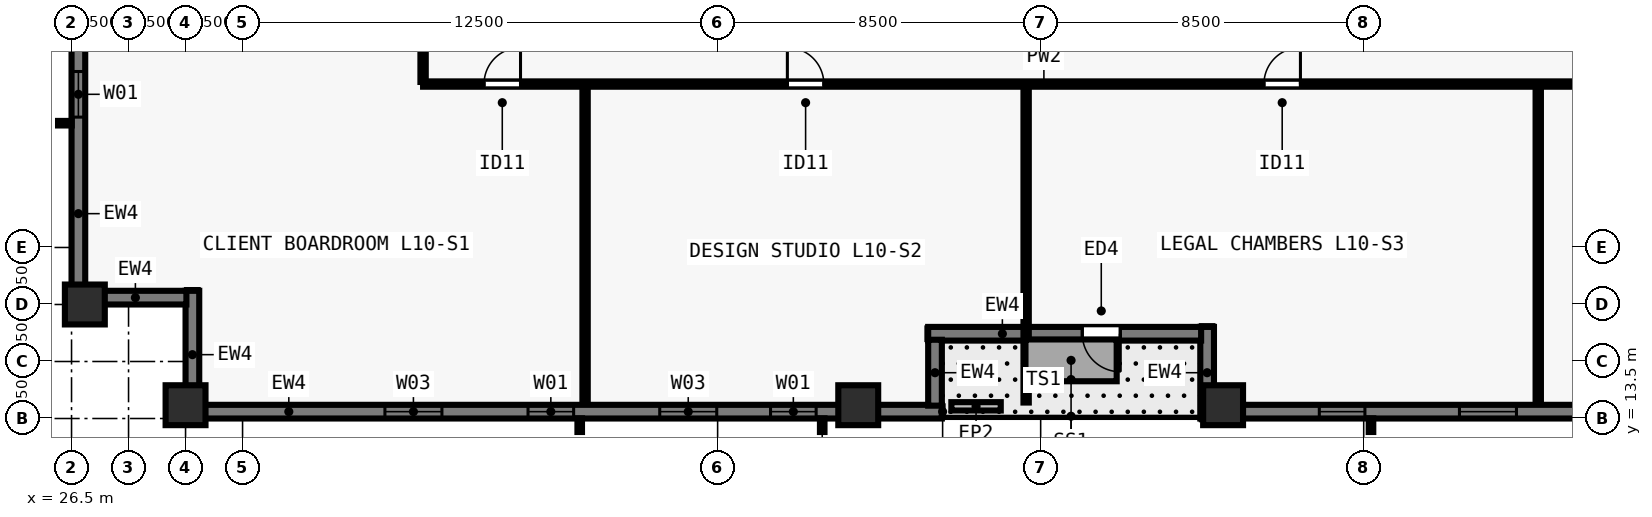
"""IFC4 building model, lengths in metres.
Left out: names, types, materials, properties, quantities, classifications, styles, units other than length and angle.
Written with IfcOpenShell. Run it as: python <this file> out.ifc"""

import sys

from ifc_helpers import new_model, si_unit, direction, frame, frame_2d, origin, origin_2d, place, context, subcontext, project, spatial, rectangle, extrude, element, fill, save


model = new_model("IFC4")
c1 = context("Model", 3, precision=1e-05, world=origin(), true_north=direction((0.0, 1.0)))
c2 = subcontext(c1, "Body", "Model", "MODEL_VIEW")
j1 = project(units=[si_unit("LENGTHUNIT", "METRE"), si_unit("PLANEANGLEUNIT", "RADIAN")], contexts=[c1])
p1 = place(None, origin())
s1 = spatial("IfcSite", under=j1, at=p1, CompositionType="ELEMENT")
p2 = place(p1, origin())
s2 = spatial("IfcBuilding", under=s1, at=p2, CompositionType="ELEMENT")
p3 = place(p2, frame((0.0, 0.0, 41.0)))
s3 = spatial("IfcBuildingStorey", under=s2, at=p3, CompositionType="ELEMENT", Elevation=41.0)
for number, where, z_axis, x_axis in (
    (1, (29.5, 13.85, 0.0), (0.0, 0.0, 1.0), (1.0, 0.0, 0.0)),
    (2, (47.2, 13.85, 0.0), (0.0, 0.0, 1.0), (1.0, 0.0, 0.0)),
    (3, (56.8, 13.85, 0.0), (0.0, 0.0, 1.0), (1.0, 0.0, 0.0)),
    (4, (26.85, 16.5, 0.0), (0.0, 0.0, 1.0), (0.0, 1.0, 0.0)),
):
    element("IfcColumn", number, at=place(p3, frame(where, z_axis=z_axis, x_axis=x_axis)), inside=s3, PredefinedType="COLUMN", context=c2, shape_type="SweptSolid", body=[
        extrude(rectangle(XDim=1.05, YDim=1.05, at=origin_2d()), origin(), (0.0, 0.0, 1.0), 3.5),
    ])
p4 = place(p3, frame((49.4, 13.68, 0.0), z_axis=(0.0, 0.0, 1.0), x_axis=(-1.0, 0.0, 0.0)))
e5 = element("IfcWall", 5, at=p4, inside=s3, PredefinedType="SOLIDWALL", context=c2, shape_type="SweptSolid", body=[
    extrude(rectangle(XDim=19.562, YDim=0.36, at=frame_2d((9.781, 0.0))), origin(), (0.0, 0.0, 1.0), 3.28),
])
p5 = place(p4, frame((3.308, 0.0, 0.8)))
e6 = element("IfcOpeningElement", 6, at=p5, cuts=e5, PredefinedType="OPENING", context=c2, shape_type="SweptSolid", body=[
    extrude(rectangle(XDim=1.2, YDim=1.544, at=frame_2d((0.6, 0.772))), frame((0.0, 0.19, 0.0), z_axis=(0.0, -1.0, 0.0), x_axis=(1.0, 0.0, 0.0)), (0.0, 0.0, 1.0), 0.38),
])
p6 = place(p4, frame((5.923, 0.0, 0.8)))
e7 = element("IfcOpeningElement", 7, at=p6, cuts=e5, PredefinedType="OPENING", context=c2, shape_type="SweptSolid", body=[
    extrude(rectangle(XDim=1.5, YDim=1.544, at=frame_2d((0.75, 0.772))), frame((0.0, 0.19, 0.0), z_axis=(0.0, -1.0, 0.0), x_axis=(1.0, 0.0, 0.0)), (0.0, 0.0, 1.0), 0.38),
])
p7 = place(p4, frame((9.689, 0.0, 0.8)))
e8 = element("IfcOpeningElement", 8, at=p7, cuts=e5, PredefinedType="OPENING", context=c2, shape_type="SweptSolid", body=[
    extrude(rectangle(XDim=1.2, YDim=1.544, at=frame_2d((0.6, 0.772))), frame((0.0, 0.19, 0.0), z_axis=(0.0, -1.0, 0.0), x_axis=(1.0, 0.0, 0.0)), (0.0, 0.0, 1.0), 0.38),
])
p8 = place(p4, frame((13.154, 0.0, 0.8)))
e9 = element("IfcOpeningElement", 9, at=p8, cuts=e5, PredefinedType="OPENING", context=c2, shape_type="SweptSolid", body=[
    extrude(rectangle(XDim=1.5, YDim=1.544, at=frame_2d((0.75, 0.772))), frame((0.0, 0.19, 0.0), z_axis=(0.0, -1.0, 0.0), x_axis=(1.0, 0.0, 0.0)), (0.0, 0.0, 1.0), 0.38),
])
p9 = place(p3, frame((29.68, 13.5, 0.0), z_axis=(0.0, 0.0, 1.0), x_axis=(0.0, 1.0, 0.0)))
e10 = element("IfcWall", 10, at=p9, inside=s3, PredefinedType="SOLIDWALL", context=c2, shape_type="SweptSolid", body=[
    extrude(rectangle(XDim=3.36, YDim=0.36, at=frame_2d((1.68, 0.0))), origin(), (0.0, 0.0, 1.0), 3.28),
])
p10 = place(p3, frame((29.522, 16.68, 0.0), z_axis=(0.0, 0.0, 1.0), x_axis=(-1.0, 0.0, 0.0)))
e11 = element("IfcWall", 11, at=p10, inside=s3, PredefinedType="SOLIDWALL", context=c2, shape_type="SweptSolid", body=[
    extrude(rectangle(XDim=2.684, YDim=0.36, at=frame_2d((1.342, 0.0))), origin(), (0.0, 0.0, 1.0), 3.28),
])
p11 = place(p3, frame((26.68, 16.5, 0.0), z_axis=(0.0, 0.0, 1.0), x_axis=(0.0, 1.0, 0.0)))
e12 = element("IfcWall", 12, at=p11, inside=s3, PredefinedType="SOLIDWALL", context=c2, shape_type="SweptSolid", body=[
    extrude(rectangle(XDim=44.662, YDim=0.36, at=frame_2d((22.331, 0.0))), origin(), (0.0, 0.0, 1.0), 3.28),
])
p12 = place(p11, frame((4.93, 0.0, 0.8)))
e13 = element("IfcOpeningElement", 13, at=p12, cuts=e12, PredefinedType="OPENING", context=c2, shape_type="SweptSolid", body=[
    extrude(rectangle(XDim=1.2, YDim=1.544, at=frame_2d((0.6, 0.772))), frame((0.0, 0.19, 0.0), z_axis=(0.0, -1.0, 0.0), x_axis=(1.0, 0.0, 0.0)), (0.0, 0.0, 1.0), 0.38),
])
p13 = place(p11, frame((8.14, 0.0, 0.8)))
e14 = element("IfcOpeningElement", 14, at=p13, cuts=e12, PredefinedType="OPENING", context=c2, shape_type="SweptSolid", body=[
    extrude(rectangle(XDim=1.5, YDim=1.544, at=frame_2d((0.75, 0.772))), frame((0.0, 0.19, 0.0), z_axis=(0.0, -1.0, 0.0), x_axis=(1.0, 0.0, 0.0)), (0.0, 0.0, 1.0), 0.38),
])
p14 = place(p11, frame((11.65, 0.0, 0.8)))
e15 = element("IfcOpeningElement", 15, at=p14, cuts=e12, PredefinedType="OPENING", context=c2, shape_type="SweptSolid", body=[
    extrude(rectangle(XDim=1.2, YDim=1.544, at=frame_2d((0.6, 0.772))), frame((0.0, 0.19, 0.0), z_axis=(0.0, -1.0, 0.0), x_axis=(1.0, 0.0, 0.0)), (0.0, 0.0, 1.0), 0.38),
])
p15 = place(p11, frame((14.861, 0.0, 0.8)))
e16 = element("IfcOpeningElement", 16, at=p15, cuts=e12, PredefinedType="OPENING", context=c2, shape_type="SweptSolid", body=[
    extrude(rectangle(XDim=1.5, YDim=1.544, at=frame_2d((0.75, 0.772))), frame((0.0, 0.19, 0.0), z_axis=(0.0, -1.0, 0.0), x_axis=(1.0, 0.0, 0.0)), (0.0, 0.0, 1.0), 0.38),
])
p16 = place(p11, frame((18.821, 0.0, 0.8)))
e17 = element("IfcOpeningElement", 17, at=p16, cuts=e12, PredefinedType="OPENING", context=c2, shape_type="SweptSolid", body=[
    extrude(rectangle(XDim=1.2, YDim=1.544, at=frame_2d((0.6, 0.772))), frame((0.0, 0.19, 0.0), z_axis=(0.0, -1.0, 0.0), x_axis=(1.0, 0.0, 0.0)), (0.0, 0.0, 1.0), 0.38),
])
p17 = place(p11, frame((20.731, 0.0, 0.8)))
e18 = element("IfcOpeningElement", 18, at=p17, cuts=e12, PredefinedType="OPENING", context=c2, shape_type="SweptSolid", body=[
    extrude(rectangle(XDim=1.5, YDim=1.544, at=frame_2d((0.75, 0.772))), frame((0.0, 0.19, 0.0), z_axis=(0.0, -1.0, 0.0), x_axis=(1.0, 0.0, 0.0)), (0.0, 0.0, 1.0), 0.38),
])
p18 = place(p11, frame((25.091, 0.0, 0.8)))
e19 = element("IfcOpeningElement", 19, at=p18, cuts=e12, PredefinedType="OPENING", context=c2, shape_type="SweptSolid", body=[
    extrude(rectangle(XDim=1.2, YDim=1.544, at=frame_2d((0.6, 0.772))), frame((0.0, 0.19, 0.0), z_axis=(0.0, -1.0, 0.0), x_axis=(1.0, 0.0, 0.0)), (0.0, 0.0, 1.0), 0.38),
])
p19 = place(p11, frame((28.302, 0.0, 0.8)))
e20 = element("IfcOpeningElement", 20, at=p19, cuts=e12, PredefinedType="OPENING", context=c2, shape_type="SweptSolid", body=[
    extrude(rectangle(XDim=1.5, YDim=1.544, at=frame_2d((0.75, 0.772))), frame((0.0, 0.19, 0.0), z_axis=(0.0, -1.0, 0.0), x_axis=(1.0, 0.0, 0.0)), (0.0, 0.0, 1.0), 0.38),
])
p20 = place(p11, frame((31.812, 0.0, 0.8)))
e21 = element("IfcOpeningElement", 21, at=p20, cuts=e12, PredefinedType="OPENING", context=c2, shape_type="SweptSolid", body=[
    extrude(rectangle(XDim=1.2, YDim=1.544, at=frame_2d((0.6, 0.772))), frame((0.0, 0.19, 0.0), z_axis=(0.0, -1.0, 0.0), x_axis=(1.0, 0.0, 0.0)), (0.0, 0.0, 1.0), 0.38),
])
p21 = place(p11, frame((35.022, 0.0, 0.8)))
e22 = element("IfcOpeningElement", 22, at=p21, cuts=e12, PredefinedType="OPENING", context=c2, shape_type="SweptSolid", body=[
    extrude(rectangle(XDim=1.5, YDim=1.544, at=frame_2d((0.75, 0.772))), frame((0.0, 0.19, 0.0), z_axis=(0.0, -1.0, 0.0), x_axis=(1.0, 0.0, 0.0)), (0.0, 0.0, 1.0), 0.38),
])
p22 = place(p11, frame((38.532, 0.0, 0.8)))
e23 = element("IfcOpeningElement", 23, at=p22, cuts=e12, PredefinedType="OPENING", context=c2, shape_type="SweptSolid", body=[
    extrude(rectangle(XDim=1.2, YDim=1.544, at=frame_2d((0.6, 0.772))), frame((0.0, 0.19, 0.0), z_axis=(0.0, -1.0, 0.0), x_axis=(1.0, 0.0, 0.0)), (0.0, 0.0, 1.0), 0.38),
])
p23 = place(p3, frame((74.5, 13.68, 0.0), z_axis=(0.0, 0.0, 1.0), x_axis=(-1.0, 0.0, 0.0)))
e24 = element("IfcWall", 24, at=p23, inside=s3, PredefinedType="SOLIDWALL", context=c2, shape_type="SweptSolid", body=[
    extrude(rectangle(XDim=17.962, YDim=0.36, at=frame_2d((8.981, 0.0))), origin(), (0.0, 0.0, 1.0), 3.28),
])
p24 = place(p23, frame((5.394, 0.0, 0.8)))
e25 = element("IfcOpeningElement", 25, at=p24, cuts=e24, PredefinedType="OPENING", context=c2, shape_type="SweptSolid", body=[
    extrude(rectangle(XDim=1.2, YDim=1.544, at=frame_2d((0.6, 0.772))), frame((0.0, 0.19, 0.0), z_axis=(0.0, -1.0, 0.0), x_axis=(1.0, 0.0, 0.0)), (0.0, 0.0, 1.0), 0.38),
])
p25 = place(p23, frame((9.981, 0.0, 0.8)))
e26 = element("IfcOpeningElement", 26, at=p25, cuts=e24, PredefinedType="OPENING", context=c2, shape_type="SweptSolid", body=[
    extrude(rectangle(XDim=1.5, YDim=1.544, at=frame_2d((0.75, 0.772))), frame((0.0, 0.19, 0.0), z_axis=(0.0, -1.0, 0.0), x_axis=(1.0, 0.0, 0.0)), (0.0, 0.0, 1.0), 0.38),
])
p26 = place(p23, frame((13.968, 0.0, 0.8)))
e27 = element("IfcOpeningElement", 27, at=p26, cuts=e24, PredefinedType="OPENING", context=c2, shape_type="SweptSolid", body=[
    extrude(rectangle(XDim=1.2, YDim=1.544, at=frame_2d((0.6, 0.772))), frame((0.0, 0.19, 0.0), z_axis=(0.0, -1.0, 0.0), x_axis=(1.0, 0.0, 0.0)), (0.0, 0.0, 1.0), 0.38),
])
p27 = place(p3, frame((56.38, 13.5, 0.0), z_axis=(0.0, 0.0, 1.0), x_axis=(0.0, 1.0, 0.0)))
e28 = element("IfcWall", 28, at=p27, inside=s3, PredefinedType="SOLIDWALL", context=c2, shape_type="SweptSolid", body=[
    extrude(rectangle(XDim=2.41, YDim=0.36, at=frame_2d((1.205, 0.0))), origin(), (0.0, 0.0, 1.0), 3.28),
])
p28 = place(p3, frame((56.222, 15.73, 0.0), z_axis=(0.0, 0.0, 1.0), x_axis=(-1.0, 0.0, 0.0)))
e29 = element("IfcWall", 29, at=p28, inside=s3, PredefinedType="SOLIDWALL", context=c2, shape_type="SweptSolid", body=[
    extrude(rectangle(XDim=7.182, YDim=0.36, at=frame_2d((3.591, 0.0))), origin(), (0.0, 0.0, 1.0), 3.28),
])
p29 = place(p28, frame((2.127, 0.0, 0.0)))
e30 = element("IfcOpeningElement", 30, at=p29, cuts=e29, PredefinedType="OPENING", context=c2, shape_type="SweptSolid", body=[
    extrude(rectangle(XDim=1.0, YDim=2.15, at=frame_2d((0.5, 1.075))), frame((0.0, 0.19, 0.0), z_axis=(0.0, -1.0, 0.0), x_axis=(1.0, 0.0, 0.0)), (0.0, 0.0, 1.0), 0.38),
])
p30 = place(p3, frame((49.22, 15.572, 0.0), z_axis=(0.0, 0.0, 1.0), x_axis=(0.0, -1.0, 0.0)))
e31 = element("IfcWall", 31, at=p30, inside=s3, PredefinedType="SOLIDWALL", context=c2, shape_type="SweptSolid", body=[
    extrude(rectangle(XDim=1.734, YDim=0.36, at=frame_2d((0.867, 0.0))), origin(), (0.0, 0.0, 1.0), 3.28),
])
p31 = place(p3, frame((49.65, 13.82, 0.0), z_axis=(0.0, 0.0, 1.0), x_axis=(1.0, 0.0, 0.0)))
e32 = element("IfcWall", 32, at=p31, inside=s3, PredefinedType="PARAPET", context=c2, shape_type="SweptSolid", body=[
    extrude(rectangle(XDim=1.3, YDim=0.22, at=frame_2d((0.65, 0.0))), origin(), (0.0, 0.0, 1.0), 0.55),
])
p32 = place(p3, frame((35.75, 22.3, 0.0), z_axis=(0.0, 0.0, 1.0), x_axis=(1.0, 0.0, 0.0)))
e33 = element("IfcWall", 33, at=p32, inside=s3, PredefinedType="PARTITIONING", context=c2, shape_type="SweptSolid", body=[
    extrude(rectangle(XDim=32.5, YDim=0.14, at=frame_2d((16.25, 0.0))), origin(), (0.0, 0.0, 1.0), 3.28),
])
p33 = place(p32, frame((1.604, 0.0, 0.0)))
e34 = element("IfcOpeningElement", 34, at=p33, cuts=e33, PredefinedType="OPENING", context=c2, shape_type="SweptSolid", body=[
    extrude(rectangle(XDim=0.96, YDim=2.12, at=frame_2d((0.48, 1.06))), frame((0.0, 0.08, 0.0), z_axis=(0.0, -1.0, 0.0), x_axis=(1.0, 0.0, 0.0)), (0.0, 0.0, 1.0), 0.16),
])
p34 = place(p32, frame((9.585, 0.0, 0.0)))
e35 = element("IfcOpeningElement", 35, at=p34, cuts=e33, PredefinedType="OPENING", context=c2, shape_type="SweptSolid", body=[
    extrude(rectangle(XDim=0.96, YDim=2.12, at=frame_2d((0.48, 1.06))), frame((0.0, 0.08, 0.0), z_axis=(0.0, -1.0, 0.0), x_axis=(1.0, 0.0, 0.0)), (0.0, 0.0, 1.0), 0.16),
])
p35 = place(p32, frame((22.125, 0.0, 0.0)))
e36 = element("IfcOpeningElement", 36, at=p35, cuts=e33, PredefinedType="OPENING", context=c2, shape_type="SweptSolid", body=[
    extrude(rectangle(XDim=0.96, YDim=2.12, at=frame_2d((0.48, 1.06))), frame((0.0, 0.08, 0.0), z_axis=(0.0, -1.0, 0.0), x_axis=(1.0, 0.0, 0.0)), (0.0, 0.0, 1.0), 0.16),
])
p36 = place(p32, frame((31.18, 0.0, 0.0)))
e37 = element("IfcOpeningElement", 37, at=p36, cuts=e33, PredefinedType="OPENING", context=c2, shape_type="SweptSolid", body=[
    extrude(rectangle(XDim=0.96, YDim=2.12, at=frame_2d((0.48, 1.06))), frame((0.0, 0.08, 0.0), z_axis=(0.0, -1.0, 0.0), x_axis=(1.0, 0.0, 0.0)), (0.0, 0.0, 1.0), 0.16),
])
p37 = place(p3, frame((35.75, 22.355, 0.0), z_axis=(0.0, 0.0, 1.0), x_axis=(0.0, 1.0, 0.0)))
e38 = element("IfcWall", 38, at=p37, inside=s3, PredefinedType="PARTITIONING", context=c2, shape_type="SweptSolid", body=[
    extrude(rectangle(XDim=33.29, YDim=0.14, at=frame_2d((16.645, 0.0))), origin(), (0.0, 0.0, 1.0), 3.28),
])
p38 = place(p37, frame((8.058, 0.0, 0.0)))
e39 = element("IfcOpeningElement", 39, at=p38, cuts=e38, PredefinedType="OPENING", context=c2, shape_type="SweptSolid", body=[
    extrude(rectangle(XDim=0.96, YDim=2.12, at=frame_2d((0.48, 1.06))), frame((0.0, 0.08, 0.0), z_axis=(0.0, -1.0, 0.0), x_axis=(1.0, 0.0, 0.0)), (0.0, 0.0, 1.0), 0.16),
])
p39 = place(p37, frame((24.658, 0.0, 0.0)))
e40 = element("IfcOpeningElement", 40, at=p39, cuts=e38, PredefinedType="OPENING", context=c2, shape_type="SweptSolid", body=[
    extrude(rectangle(XDim=0.96, YDim=2.12, at=frame_2d((0.48, 1.06))), frame((0.0, 0.08, 0.0), z_axis=(0.0, -1.0, 0.0), x_axis=(1.0, 0.0, 0.0)), (0.0, 0.0, 1.0), 0.16),
])
p40 = place(p3, frame((40.012, 13.92, 0.0), z_axis=(0.0, 0.0, 1.0), x_axis=(0.0, 1.0, 0.0)))
e41 = element("IfcWall", 41, at=p40, inside=s3, PredefinedType="PARTITIONING", context=c2, shape_type="SweptSolid", body=[
    extrude(rectangle(XDim=8.28, YDim=0.14, at=frame_2d((4.14, 0.0))), origin(), (0.0, 0.0, 1.0), 3.28),
])
p41 = place(p3, frame((51.617, 13.92, 0.0), z_axis=(0.0, 0.0, 1.0), x_axis=(0.0, 1.0, 0.0)))
e42 = element("IfcWall", 42, at=p41, inside=s3, PredefinedType="PARTITIONING", context=c2, shape_type="SweptSolid", body=[
    extrude(rectangle(XDim=8.28, YDim=0.14, at=frame_2d((4.14, 0.0))), origin(), (0.0, 0.0, 1.0), 2.849),
])
p42 = place(p3, frame((65.093, 13.92, 0.0), z_axis=(0.0, 0.0, 1.0), x_axis=(0.0, 1.0, 0.0)))
e43 = element("IfcWall", 43, at=p42, inside=s3, PredefinedType="PARTITIONING", context=c2, shape_type="SweptSolid", body=[
    extrude(rectangle(XDim=8.28, YDim=0.14, at=frame_2d((4.14, 0.0))), origin(), (0.0, 0.0, 1.0), 3.28),
])
p43 = place(p5, origin())
e44 = element("IfcWindow", 44, at=p43, inside=s3, PartitioningType="SINGLE_PANEL", PredefinedType="WINDOW", context=c2, shape_type="SweptSolid", body=[
    extrude(rectangle(XDim=1.2, YDim=1.544, at=frame_2d((0.6, 0.772))), frame((0.0, -0.05, 0.0), z_axis=(0.0, -1.0, 0.0), x_axis=(1.0, 0.0, 0.0)), (0.0, 0.0, 1.0), 0.06),
])
fill(e6, e44)
p44 = place(p6, origin())
e45 = element("IfcWindow", 45, at=p44, inside=s3, PartitioningType="SINGLE_PANEL", PredefinedType="WINDOW", context=c2, shape_type="SweptSolid", body=[
    extrude(rectangle(XDim=1.5, YDim=1.544, at=frame_2d((0.75, 0.772))), frame((0.0, -0.05, 0.0), z_axis=(0.0, -1.0, 0.0), x_axis=(1.0, 0.0, 0.0)), (0.0, 0.0, 1.0), 0.06),
])
fill(e7, e45)
p45 = place(p7, origin())
e46 = element("IfcWindow", 46, at=p45, inside=s3, PartitioningType="SINGLE_PANEL", PredefinedType="WINDOW", context=c2, shape_type="SweptSolid", body=[
    extrude(rectangle(XDim=1.2, YDim=1.544, at=frame_2d((0.6, 0.772))), frame((0.0, -0.05, 0.0), z_axis=(0.0, -1.0, 0.0), x_axis=(1.0, 0.0, 0.0)), (0.0, 0.0, 1.0), 0.06),
])
fill(e8, e46)
p46 = place(p8, origin())
e47 = element("IfcWindow", 47, at=p46, inside=s3, PartitioningType="SINGLE_PANEL", PredefinedType="WINDOW", context=c2, shape_type="SweptSolid", body=[
    extrude(rectangle(XDim=1.5, YDim=1.544, at=frame_2d((0.75, 0.772))), frame((0.0, -0.05, 0.0), z_axis=(0.0, -1.0, 0.0), x_axis=(1.0, 0.0, 0.0)), (0.0, 0.0, 1.0), 0.06),
])
fill(e9, e47)
p47 = place(p12, origin())
e48 = element("IfcWindow", 48, at=p47, inside=s3, PartitioningType="SINGLE_PANEL", PredefinedType="WINDOW", context=c2, shape_type="SweptSolid", body=[
    extrude(rectangle(XDim=1.2, YDim=1.544, at=frame_2d((0.6, 0.772))), frame((0.0, -0.05, 0.0), z_axis=(0.0, -1.0, 0.0), x_axis=(1.0, 0.0, 0.0)), (0.0, 0.0, 1.0), 0.06),
])
fill(e13, e48)
p48 = place(p25, origin())
e49 = element("IfcWindow", 49, at=p48, inside=s3, PartitioningType="SINGLE_PANEL", PredefinedType="WINDOW", context=c2, shape_type="SweptSolid", body=[
    extrude(rectangle(XDim=1.5, YDim=1.544, at=frame_2d((0.75, 0.772))), frame((0.0, -0.05, 0.0), z_axis=(0.0, -1.0, 0.0), x_axis=(1.0, 0.0, 0.0)), (0.0, 0.0, 1.0), 0.06),
])
fill(e26, e49)
p49 = place(p26, origin())
e50 = element("IfcWindow", 50, at=p49, inside=s3, PartitioningType="SINGLE_PANEL", PredefinedType="WINDOW", context=c2, shape_type="SweptSolid", body=[
    extrude(rectangle(XDim=1.2, YDim=1.544, at=frame_2d((0.6, 0.772))), frame((0.0, -0.05, 0.0), z_axis=(0.0, -1.0, 0.0), x_axis=(1.0, 0.0, 0.0)), (0.0, 0.0, 1.0), 0.06),
])
fill(e27, e50)
p50 = place(p29, origin())
e51 = element("IfcDoor", 51, at=p50, inside=s3, OperationType="SINGLE_SWING_LEFT", PredefinedType="DOOR", context=c2, shape_type="SweptSolid", body=[
    extrude(rectangle(XDim=1.0, YDim=2.15, at=frame_2d((0.5, 1.075))), frame((0.0, 0.025, 0.0), z_axis=(0.0, -1.0, 0.0), x_axis=(1.0, 0.0, 0.0)), (0.0, 0.0, 1.0), 0.05),
])
fill(e30, e51)
p51 = place(p33, origin())
e52 = element("IfcDoor", 52, at=p51, inside=s3, OperationType="SINGLE_SWING_RIGHT", PredefinedType="DOOR", context=c2, shape_type="SweptSolid", body=[
    extrude(rectangle(XDim=0.96, YDim=2.12, at=frame_2d((0.48, 1.06))), frame((0.0, 0.025, 0.0), z_axis=(0.0, -1.0, 0.0), x_axis=(1.0, 0.0, 0.0)), (0.0, 0.0, 1.0), 0.05),
])
fill(e34, e52)
p52 = place(p34, origin())
e53 = element("IfcDoor", 53, at=p52, inside=s3, OperationType="SINGLE_SWING_LEFT", PredefinedType="DOOR", context=c2, shape_type="SweptSolid", body=[
    extrude(rectangle(XDim=0.96, YDim=2.12, at=frame_2d((0.48, 1.06))), frame((0.0, 0.025, 0.0), z_axis=(0.0, -1.0, 0.0), x_axis=(1.0, 0.0, 0.0)), (0.0, 0.0, 1.0), 0.05),
])
fill(e35, e53)
p53 = place(p35, origin())
e54 = element("IfcDoor", 54, at=p53, inside=s3, OperationType="SINGLE_SWING_RIGHT", PredefinedType="DOOR", context=c2, shape_type="SweptSolid", body=[
    extrude(rectangle(XDim=0.96, YDim=2.12, at=frame_2d((0.48, 1.06))), frame((0.0, 0.025, 0.0), z_axis=(0.0, -1.0, 0.0), x_axis=(1.0, 0.0, 0.0)), (0.0, 0.0, 1.0), 0.05),
])
fill(e36, e54)
save(model, sys.argv[1])
